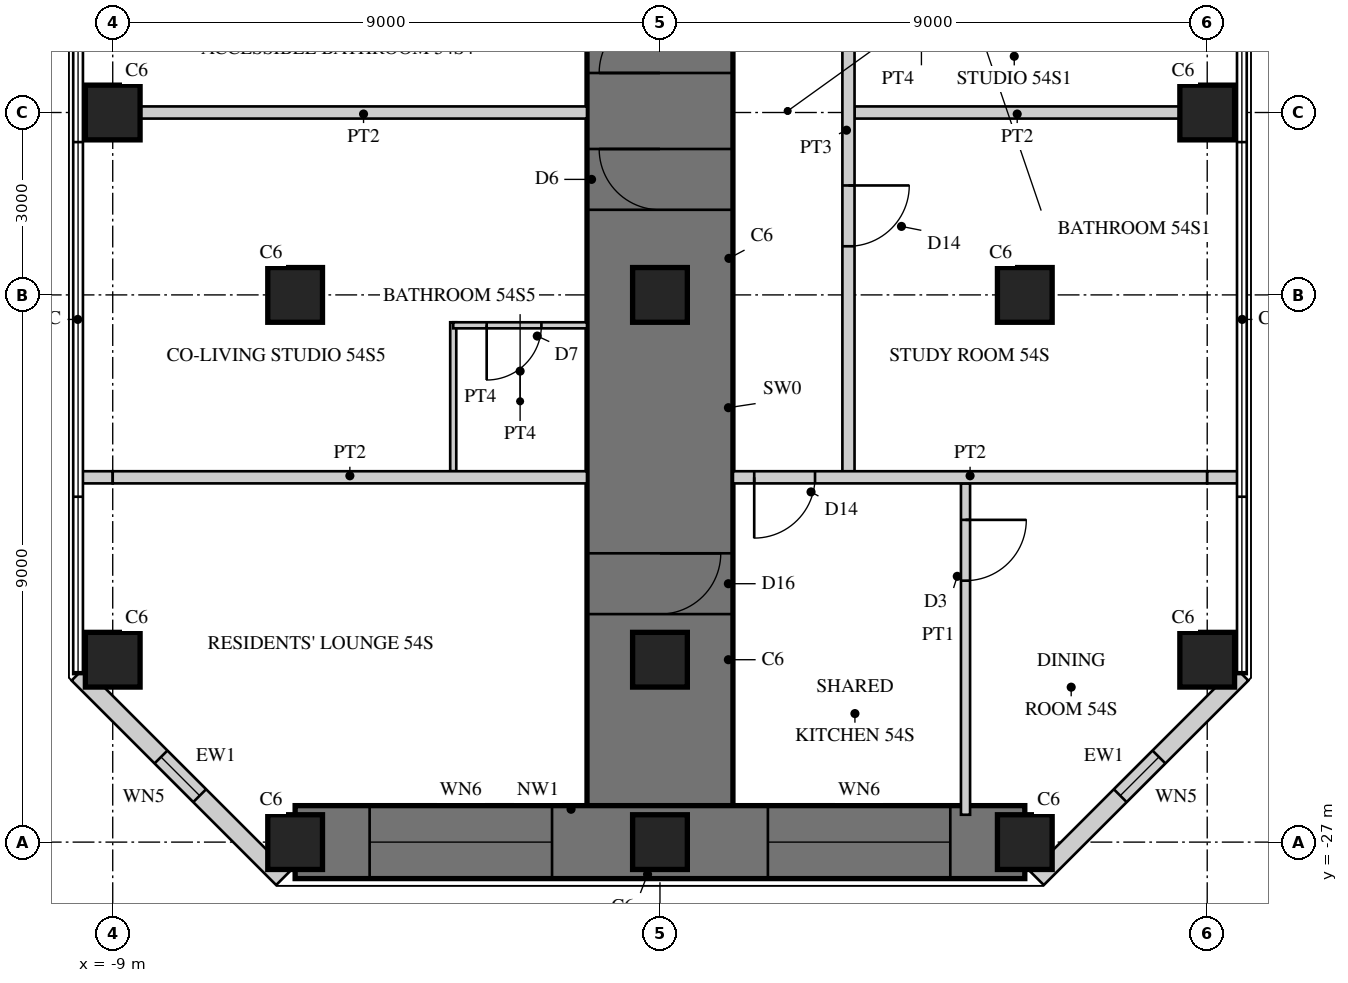
"""IFC4 building model, lengths in metres.
Left out: names, types, materials, properties, quantities, classifications, styles, units other than length and angle.
Written with IfcOpenShell. Run it as: python <this file> out.ifc"""

import sys

from ifc_helpers import new_model, si_unit, direction, frame, frame_2d, origin, origin_2d, place, context, subcontext, project, spatial, rectangle, hollow_rectangle, extrude, element, fill, save


model = new_model("IFC4")
c1 = context("Model", 3, precision=1e-05, world=origin(), true_north=direction((0.0, 1.0)))
c2 = subcontext(c1, "Body", "Model", "MODEL_VIEW")
j1 = project(units=[si_unit("LENGTHUNIT", "METRE"), si_unit("PLANEANGLEUNIT", "RADIAN")], contexts=[c1])
p1 = place(None, origin())
s1 = spatial("IfcSite", under=j1, at=p1, CompositionType="ELEMENT")
p2 = place(p1, origin())
s2 = spatial("IfcBuilding", under=s1, at=p2, CompositionType="ELEMENT")
p3 = place(p2, frame((0.0, 0.0, 213.7)))
s3 = spatial("IfcBuildingStorey", under=s2, at=p3, CompositionType="ELEMENT", Elevation=213.7)
p4 = place(p3, frame((0.0, -13.05, 0.0), z_axis=(0.0, 0.0, 1.0), x_axis=(0.0, -1.0, 0.0)))
e1 = element("IfcWall", 1, at=p4, inside=s3, PredefinedType="SHEAR", context=c2, shape_type="SweptSolid", body=[
    extrude(rectangle(XDim=13.95, YDim=2.4, at=frame_2d((6.975, 0.0))), origin(), (0.0, 0.0, 1.0), 3.4),
])
p5 = place(p4, frame((0.3, 0.0, 0.0)))
e2 = element("IfcOpeningElement", 2, at=p5, cuts=e1, PredefinedType="OPENING", context=c2, shape_type="SweptSolid", body=[
    extrude(rectangle(XDim=1.0, YDim=2.15, at=frame_2d((0.5, 1.075))), frame((0.0, 1.21, 0.0), z_axis=(0.0, -1.0, 0.0), x_axis=(1.0, 0.0, 0.0)), (0.0, 0.0, 1.0), 2.42),
])
p6 = place(p4, frame((2.55, 0.0, 0.0)))
e3 = element("IfcOpeningElement", 3, at=p6, cuts=e1, PredefinedType="OPENING", context=c2, shape_type="SweptSolid", body=[
    extrude(rectangle(XDim=1.0, YDim=2.15, at=frame_2d((0.5, 1.075))), frame((0.0, 1.21, 0.0), z_axis=(0.0, -1.0, 0.0), x_axis=(1.0, 0.0, 0.0)), (0.0, 0.0, 1.0), 2.42),
])
p7 = place(p4, frame((9.2, 0.0, 0.0)))
e4 = element("IfcOpeningElement", 4, at=p7, cuts=e1, PredefinedType="OPENING", context=c2, shape_type="SweptSolid", body=[
    extrude(rectangle(XDim=1.0, YDim=2.0, at=frame_2d((0.5, 1.0))), frame((0.0, 1.21, 0.0), z_axis=(0.0, -1.0, 0.0), x_axis=(1.0, 0.0, 0.0)), (0.0, 0.0, 1.0), 2.42),
])
p8 = place(p3, frame((-6.0, -27.0, 0.0), z_axis=(0.0, 0.0, 1.0), x_axis=(1.0, 0.0, 0.0)))
e5 = element("IfcWall", 5, at=p8, inside=s3, PredefinedType="SHEAR", context=c2, shape_type="SweptSolid", body=[
    extrude(rectangle(XDim=12.0, YDim=1.2, at=frame_2d((6.0, 0.0))), origin(), (0.0, 0.0, 1.0), 3.4),
])
p9 = place(p8, frame((1.225, 0.0, 0.6)))
e6 = element("IfcOpeningElement", 6, at=p9, cuts=e5, PredefinedType="OPENING", context=c2, shape_type="SweptSolid", body=[
    extrude(rectangle(XDim=3.0, YDim=2.4, at=frame_2d((1.5, 1.2))), frame((0.0, 0.61, 0.0), z_axis=(0.0, -1.0, 0.0), x_axis=(1.0, 0.0, 0.0)), (0.0, 0.0, 1.0), 1.22),
])
p10 = place(p8, frame((7.775, 0.0, 0.6)))
e7 = element("IfcOpeningElement", 7, at=p10, cuts=e5, PredefinedType="OPENING", context=c2, shape_type="SweptSolid", body=[
    extrude(rectangle(XDim=3.0, YDim=2.4, at=frame_2d((1.5, 1.2))), frame((0.0, 0.61, 0.0), z_axis=(0.0, -1.0, 0.0), x_axis=(1.0, 0.0, 0.0)), (0.0, 0.0, 1.0), 1.22),
])
for number, where, z_axis, x_axis in (
    (8, (-9.0, -15.0, 0.0), (0.0, 0.0, 1.0), (1.0, 0.0, 0.0)),
    (9, (-9.0, -24.0, 0.0), (0.0, 0.0, 1.0), (1.0, 0.0, 0.0)),
    (10, (9.0, -15.0, 0.0), (0.0, 0.0, 1.0), (1.0, 0.0, 0.0)),
    (11, (9.0, -24.0, 0.0), (0.0, 0.0, 1.0), (1.0, 0.0, 0.0)),
    (12, (-6.0, -27.0, 0.0), (0.0, 0.0, 1.0), (1.0, 0.0, 0.0)),
    (13, (0.0, -27.0, 0.0), (0.0, 0.0, 1.0), (1.0, 0.0, 0.0)),
    (14, (6.0, -27.0, 0.0), (0.0, 0.0, 1.0), (1.0, 0.0, 0.0)),
    (15, (-6.0, -18.0, 0.0), (0.0, 0.0, 1.0), (1.0, 0.0, 0.0)),
    (16, (0.0, -18.0, 0.0), (0.0, 0.0, 1.0), (1.0, 0.0, 0.0)),
    (17, (6.0, -18.0, 0.0), (0.0, 0.0, 1.0), (1.0, 0.0, 0.0)),
    (18, (0.0, -24.0, 0.0), (0.0, 0.0, 1.0), (1.0, 0.0, 0.0)),
):
    element("IfcColumn", number, at=place(p3, frame(where, z_axis=z_axis, x_axis=x_axis)), inside=s3, PredefinedType="COLUMN", context=c2, shape_type="SweptSolid", body=[
        extrude(rectangle(XDim=0.9, YDim=0.9, at=origin_2d()), origin(), (0.0, 0.0, 1.0), 3.4),
    ])
p11 = place(p3, frame((-9.57, -24.236, 0.0), z_axis=(0.0, 0.0, 1.0), x_axis=(0.707106781187, -0.707106781187, 0.0)))
e19 = element("IfcWall", 19, at=p11, inside=s3, PredefinedType="SOLIDWALL", context=c2, shape_type="SweptSolid", body=[
    extrude(rectangle(XDim=4.757, YDim=0.3, at=frame_2d((2.379, 0.0))), origin(), (0.0, 0.0, 1.0), 3.15),
])
p12 = place(p11, frame((1.929, 0.0, 0.3)))
e20 = element("IfcOpeningElement", 20, at=p12, cuts=e19, PredefinedType="OPENING", context=c2, shape_type="SweptSolid", body=[
    extrude(rectangle(XDim=0.9, YDim=2.4, at=frame_2d((0.45, 1.2))), frame((0.0, 0.16, 0.0), z_axis=(0.0, -1.0, 0.0), x_axis=(1.0, 0.0, 0.0)), (0.0, 0.0, 1.0), 0.32),
])
p13 = place(p3, frame((6.206, -27.6, 0.0), z_axis=(0.0, 0.0, 1.0), x_axis=(0.707106781187, 0.707106781187, 0.0)))
e21 = element("IfcWall", 21, at=p13, inside=s3, PredefinedType="SOLIDWALL", context=c2, shape_type="SweptSolid", body=[
    extrude(rectangle(XDim=4.757, YDim=0.3, at=frame_2d((2.379, 0.0))), origin(), (0.0, 0.0, 1.0), 3.15),
])
p14 = place(p13, frame((1.929, 0.0, 0.3)))
e22 = element("IfcOpeningElement", 22, at=p14, cuts=e21, PredefinedType="OPENING", context=c2, shape_type="SweptSolid", body=[
    extrude(rectangle(XDim=0.9, YDim=2.4, at=frame_2d((0.45, 1.2))), frame((0.0, 0.16, 0.0), z_axis=(0.0, -1.0, 0.0), x_axis=(1.0, 0.0, 0.0)), (0.0, 0.0, 1.0), 0.32),
])
p15 = place(p3, frame((3.2, -15.0, 0.0), z_axis=(0.0, 0.0, 1.0), x_axis=(1.0, 0.0, 0.0)))
e23 = element("IfcWall", 23, at=p15, inside=s3, PredefinedType="SOLIDWALL", context=c2, shape_type="SweptSolid", body=[
    extrude(rectangle(XDim=5.35, YDim=0.2, at=frame_2d((2.675, 0.0))), origin(), (0.0, 0.0, 1.0), 2.1),
])
p16 = place(p3, frame((-8.55, -15.0, 0.0), z_axis=(0.0, 0.0, 1.0), x_axis=(1.0, 0.0, 0.0)))
e24 = element("IfcWall", 24, at=p16, inside=s3, PredefinedType="SOLIDWALL", context=c2, shape_type="SweptSolid", body=[
    extrude(rectangle(XDim=7.35, YDim=0.2, at=frame_2d((3.675, 0.0))), origin(), (0.0, 0.0, 1.0), 2.1),
])
p17 = place(p3, frame((-3.4, -18.45, 0.0), z_axis=(0.0, 0.0, 1.0), x_axis=(0.0, -1.0, 0.0)))
e25 = element("IfcWall", 25, at=p17, inside=s3, PredefinedType="PARTITIONING", context=c2, shape_type="SweptSolid", body=[
    extrude(rectangle(XDim=2.45, YDim=0.1, at=frame_2d((1.225, 0.0))), origin(), (0.0, 0.0, 1.0), 3.15),
])
p18 = place(p3, frame((-3.4, -18.5, 0.0), z_axis=(0.0, 0.0, 1.0), x_axis=(1.0, 0.0, 0.0)))
e26 = element("IfcWall", 26, at=p18, inside=s3, PredefinedType="PARTITIONING", context=c2, shape_type="SweptSolid", body=[
    extrude(rectangle(XDim=2.2, YDim=0.1, at=frame_2d((1.1, 0.0))), origin(), (0.0, 0.0, 1.0), 3.15),
])
p19 = place(p18, frame((0.55, 0.0, 0.0)))
e27 = element("IfcOpeningElement", 27, at=p19, cuts=e26, PredefinedType="OPENING", context=c2, shape_type="SweptSolid", body=[
    extrude(rectangle(XDim=0.9, YDim=2.1, at=frame_2d((0.45, 1.05))), frame((0.0, 0.06, 0.0), z_axis=(0.0, -1.0, 0.0), x_axis=(1.0, 0.0, 0.0)), (0.0, 0.0, 1.0), 0.12),
])
p20 = place(p3, frame((3.1, -9.55, 0.0), z_axis=(0.0, 0.0, 1.0), x_axis=(0.0, -1.0, 0.0)))
e28 = element("IfcWall", 28, at=p20, inside=s3, PredefinedType="SOLIDWALL", context=c2, shape_type="SweptSolid", body=[
    extrude(rectangle(XDim=11.45, YDim=0.2, at=frame_2d((5.725, 0.0))), origin(), (0.0, 0.0, 1.0), 3.15),
])
p21 = place(p20, frame((3.4, 0.0, 0.0)))
e29 = element("IfcOpeningElement", 29, at=p21, cuts=e28, PredefinedType="OPENING", context=c2, shape_type="SweptSolid", body=[
    extrude(rectangle(XDim=1.0, YDim=2.15, at=frame_2d((0.5, 1.075))), frame((0.0, 0.11, 0.0), z_axis=(0.0, -1.0, 0.0), x_axis=(1.0, 0.0, 0.0)), (0.0, 0.0, 1.0), 0.22),
])
p22 = place(p20, frame((6.65, 0.0, 0.0)))
e30 = element("IfcOpeningElement", 30, at=p22, cuts=e28, PredefinedType="OPENING", context=c2, shape_type="SweptSolid", body=[
    extrude(rectangle(XDim=1.0, YDim=2.2, at=frame_2d((0.5, 1.1))), frame((0.0, 0.11, 0.0), z_axis=(0.0, -1.0, 0.0), x_axis=(1.0, 0.0, 0.0)), (0.0, 0.0, 1.0), 0.22),
])
p23 = place(p3, frame((5.025, -21.1, 0.0), z_axis=(0.0, 0.0, 1.0), x_axis=(0.0, -1.0, 0.0)))
e31 = element("IfcWall", 31, at=p23, inside=s3, PredefinedType="PARTITIONING", context=c2, shape_type="SweptSolid", body=[
    extrude(rectangle(XDim=5.45, YDim=0.15, at=frame_2d((2.725, 0.0))), origin(), (0.0, 0.0, 1.0), 3.15),
])
p24 = place(p23, frame((0.6, 0.0, 0.0)))
e32 = element("IfcOpeningElement", 32, at=p24, cuts=e31, PredefinedType="OPENING", context=c2, shape_type="SweptSolid", body=[
    extrude(rectangle(XDim=1.0, YDim=2.1, at=frame_2d((0.5, 1.05))), frame((0.0, 0.085, 0.0), z_axis=(0.0, -1.0, 0.0), x_axis=(1.0, 0.0, 0.0)), (0.0, 0.0, 1.0), 0.17),
])
p25 = place(p3, frame((-9.53, -21.0, 0.0), z_axis=(0.0, 0.0, 1.0), x_axis=(1.0, 0.0, 0.0)))
e33 = element("IfcWall", 33, at=p25, inside=s3, PredefinedType="SOLIDWALL", context=c2, shape_type="SweptSolid", body=[
    extrude(rectangle(XDim=0.53, YDim=0.2, at=frame_2d((0.265, 0.0))), origin(), (0.0, 0.0, 1.0), 3.15),
])
p26 = place(p3, frame((-9.0, -21.0, 0.0), z_axis=(0.0, 0.0, 1.0), x_axis=(1.0, 0.0, 0.0)))
e34 = element("IfcWall", 34, at=p26, inside=s3, PredefinedType="SOLIDWALL", context=c2, shape_type="SweptSolid", body=[
    extrude(rectangle(XDim=7.8, YDim=0.2, at=frame_2d((3.9, 0.0))), origin(), (0.0, 0.0, 1.0), 2.3),
])
p27 = place(p3, frame((1.2, -21.0, 0.0), z_axis=(0.0, 0.0, 1.0), x_axis=(1.0, 0.0, 0.0)))
e35 = element("IfcWall", 35, at=p27, inside=s3, PredefinedType="SOLIDWALL", context=c2, shape_type="SweptSolid", body=[
    extrude(rectangle(XDim=7.8, YDim=0.2, at=frame_2d((3.9, 0.0))), origin(), (0.0, 0.0, 1.0), 2.3),
])
p28 = place(p27, frame((0.35, 0.0, 0.0)))
e36 = element("IfcOpeningElement", 36, at=p28, cuts=e35, PredefinedType="OPENING", context=c2, shape_type="SweptSolid", body=[
    extrude(rectangle(XDim=1.0, YDim=2.2, at=frame_2d((0.5, 1.1))), frame((0.0, 0.11, 0.0), z_axis=(0.0, -1.0, 0.0), x_axis=(1.0, 0.0, 0.0)), (0.0, 0.0, 1.0), 0.22),
])
p29 = place(p3, frame((9.0, -21.0, 0.0), z_axis=(0.0, 0.0, 1.0), x_axis=(1.0, 0.0, 0.0)))
e37 = element("IfcWall", 37, at=p29, inside=s3, PredefinedType="SOLIDWALL", context=c2, shape_type="SweptSolid", body=[
    extrude(rectangle(XDim=0.53, YDim=0.2, at=frame_2d((0.265, 0.0))), origin(), (0.0, 0.0, 1.0), 3.15),
])
p30 = place(p12, origin())
e38 = element("IfcWindow", 38, at=p30, inside=s3, PartitioningType="SINGLE_PANEL", PredefinedType="WINDOW", context=c2, shape_type="SweptSolid", body=[
    extrude(hollow_rectangle(XDim=0.9, YDim=2.4, WallThickness=0.06, at=frame_2d((0.45, 1.2))), frame((0.0, 0.03, 0.0), z_axis=(0.0, -1.0, 0.0), x_axis=(1.0, 0.0, 0.0)), (0.0, 0.0, 1.0), 0.06),
    extrude(rectangle(XDim=0.779, YDim=2.279, at=frame_2d((0.45, 1.2))), frame((0.0, 0.03, 0.0), z_axis=(0.0, -1.0, 0.0), x_axis=(1.0, 0.0, 0.0)), (0.0, 0.0, 1.0), 0.06),
])
fill(e20, e38)
p31 = place(p9, origin())
e39 = element("IfcWindow", 39, at=p31, inside=s3, PartitioningType="SINGLE_PANEL", PredefinedType="WINDOW", context=c2, shape_type="SweptSolid", body=[
    extrude(hollow_rectangle(XDim=3.0, YDim=2.4, WallThickness=0.06, at=frame_2d((1.5, 1.2))), frame((0.0, 0.03, 0.0), z_axis=(0.0, -1.0, 0.0), x_axis=(1.0, 0.0, 0.0)), (0.0, 0.0, 1.0), 0.06),
    extrude(rectangle(XDim=2.879, YDim=2.279, at=frame_2d((1.5, 1.2))), frame((0.0, 0.03, 0.0), z_axis=(0.0, -1.0, 0.0), x_axis=(1.0, 0.0, 0.0)), (0.0, 0.0, 1.0), 0.06),
])
fill(e6, e39)
p32 = place(p10, origin())
e40 = element("IfcWindow", 40, at=p32, inside=s3, PartitioningType="SINGLE_PANEL", PredefinedType="WINDOW", context=c2, shape_type="SweptSolid", body=[
    extrude(hollow_rectangle(XDim=3.0, YDim=2.4, WallThickness=0.06, at=frame_2d((1.5, 1.2))), frame((0.0, 0.03, 0.0), z_axis=(0.0, -1.0, 0.0), x_axis=(1.0, 0.0, 0.0)), (0.0, 0.0, 1.0), 0.06),
    extrude(rectangle(XDim=2.879, YDim=2.279, at=frame_2d((1.5, 1.2))), frame((0.0, 0.03, 0.0), z_axis=(0.0, -1.0, 0.0), x_axis=(1.0, 0.0, 0.0)), (0.0, 0.0, 1.0), 0.06),
])
fill(e7, e40)
p33 = place(p14, origin())
e41 = element("IfcWindow", 41, at=p33, inside=s3, PartitioningType="SINGLE_PANEL", PredefinedType="WINDOW", context=c2, shape_type="SweptSolid", body=[
    extrude(hollow_rectangle(XDim=0.9, YDim=2.4, WallThickness=0.06, at=frame_2d((0.45, 1.2))), frame((0.0, 0.03, 0.0), z_axis=(0.0, -1.0, 0.0), x_axis=(1.0, 0.0, 0.0)), (0.0, 0.0, 1.0), 0.06),
    extrude(rectangle(XDim=0.779, YDim=2.279, at=frame_2d((0.45, 1.2))), frame((0.0, 0.03, 0.0), z_axis=(0.0, -1.0, 0.0), x_axis=(1.0, 0.0, 0.0)), (0.0, 0.0, 1.0), 0.06),
])
fill(e22, e41)
p34 = place(p19, frame((0.9, 0.0, 0.0), z_axis=(0.0, 0.0, 1.0), x_axis=(-1.0, 0.0, 0.0)))
e42 = element("IfcDoor", 42, at=p34, inside=s3, OperationType="SINGLE_SWING_RIGHT", PredefinedType="DOOR", context=c2, shape_type="SweptSolid", body=[
    extrude(rectangle(XDim=0.9, YDim=2.1, at=frame_2d((0.45, 1.05))), frame((0.0, 0.025, 0.0), z_axis=(0.0, -1.0, 0.0), x_axis=(1.0, 0.0, 0.0)), (0.0, 0.0, 1.0), 0.05),
])
fill(e27, e42)
p35 = place(p22, origin())
e43 = element("IfcDoor", 43, at=p35, inside=s3, OperationType="SINGLE_SWING_LEFT", PredefinedType="DOOR", context=c2, shape_type="SweptSolid", body=[
    extrude(rectangle(XDim=1.0, YDim=2.2, at=frame_2d((0.5, 1.1))), frame((0.0, 0.025, 0.0), z_axis=(0.0, -1.0, 0.0), x_axis=(1.0, 0.0, 0.0)), (0.0, 0.0, 1.0), 0.05),
])
fill(e30, e43)
p36 = place(p24, origin())
e44 = element("IfcDoor", 44, at=p36, inside=s3, OperationType="SINGLE_SWING_LEFT", PredefinedType="DOOR", context=c2, shape_type="SweptSolid", body=[
    extrude(rectangle(XDim=1.0, YDim=2.1, at=frame_2d((0.5, 1.05))), frame((0.0, 0.025, 0.0), z_axis=(0.0, -1.0, 0.0), x_axis=(1.0, 0.0, 0.0)), (0.0, 0.0, 1.0), 0.05),
])
fill(e32, e44)
p37 = place(p28, frame((1.0, 0.0, 0.0), z_axis=(0.0, 0.0, 1.0), x_axis=(-1.0, 0.0, 0.0)))
e45 = element("IfcDoor", 45, at=p37, inside=s3, OperationType="SINGLE_SWING_RIGHT", PredefinedType="DOOR", context=c2, shape_type="SweptSolid", body=[
    extrude(rectangle(XDim=1.0, YDim=2.2, at=frame_2d((0.5, 1.1))), frame((0.0, 0.025, 0.0), z_axis=(0.0, -1.0, 0.0), x_axis=(1.0, 0.0, 0.0)), (0.0, 0.0, 1.0), 0.05),
])
fill(e36, e45)
p38 = place(p5, frame((1.0, 0.0, 0.0), z_axis=(0.0, 0.0, 1.0), x_axis=(-1.0, 0.0, 0.0)))
e46 = element("IfcDoor", 46, at=p38, inside=s3, OperationType="SINGLE_SWING_LEFT", PredefinedType="DOOR", context=c2, shape_type="SweptSolid", body=[
    extrude(rectangle(XDim=1.0, YDim=2.15, at=frame_2d((0.5, 1.075))), frame((0.0, 0.025, 0.0), z_axis=(0.0, -1.0, 0.0), x_axis=(1.0, 0.0, 0.0)), (0.0, 0.0, 1.0), 0.05),
])
fill(e2, e46)
p39 = place(p6, frame((1.0, 0.0, 0.0), z_axis=(0.0, 0.0, 1.0), x_axis=(-1.0, 0.0, 0.0)))
e47 = element("IfcDoor", 47, at=p39, inside=s3, OperationType="SINGLE_SWING_RIGHT", PredefinedType="DOOR", context=c2, shape_type="SweptSolid", body=[
    extrude(rectangle(XDim=1.0, YDim=2.15, at=frame_2d((0.5, 1.075))), frame((0.0, 0.025, 0.0), z_axis=(0.0, -1.0, 0.0), x_axis=(1.0, 0.0, 0.0)), (0.0, 0.0, 1.0), 0.05),
])
fill(e3, e47)
p40 = place(p7, origin())
e48 = element("IfcDoor", 48, at=p40, inside=s3, OperationType="SINGLE_SWING_LEFT", PredefinedType="DOOR", context=c2, shape_type="SweptSolid", body=[
    extrude(rectangle(XDim=1.0, YDim=2.0, at=frame_2d((0.5, 1.0))), frame((0.0, 0.025, 0.0), z_axis=(0.0, -1.0, 0.0), x_axis=(1.0, 0.0, 0.0)), (0.0, 0.0, 1.0), 0.05),
])
fill(e4, e48)
save(model, sys.argv[1])
